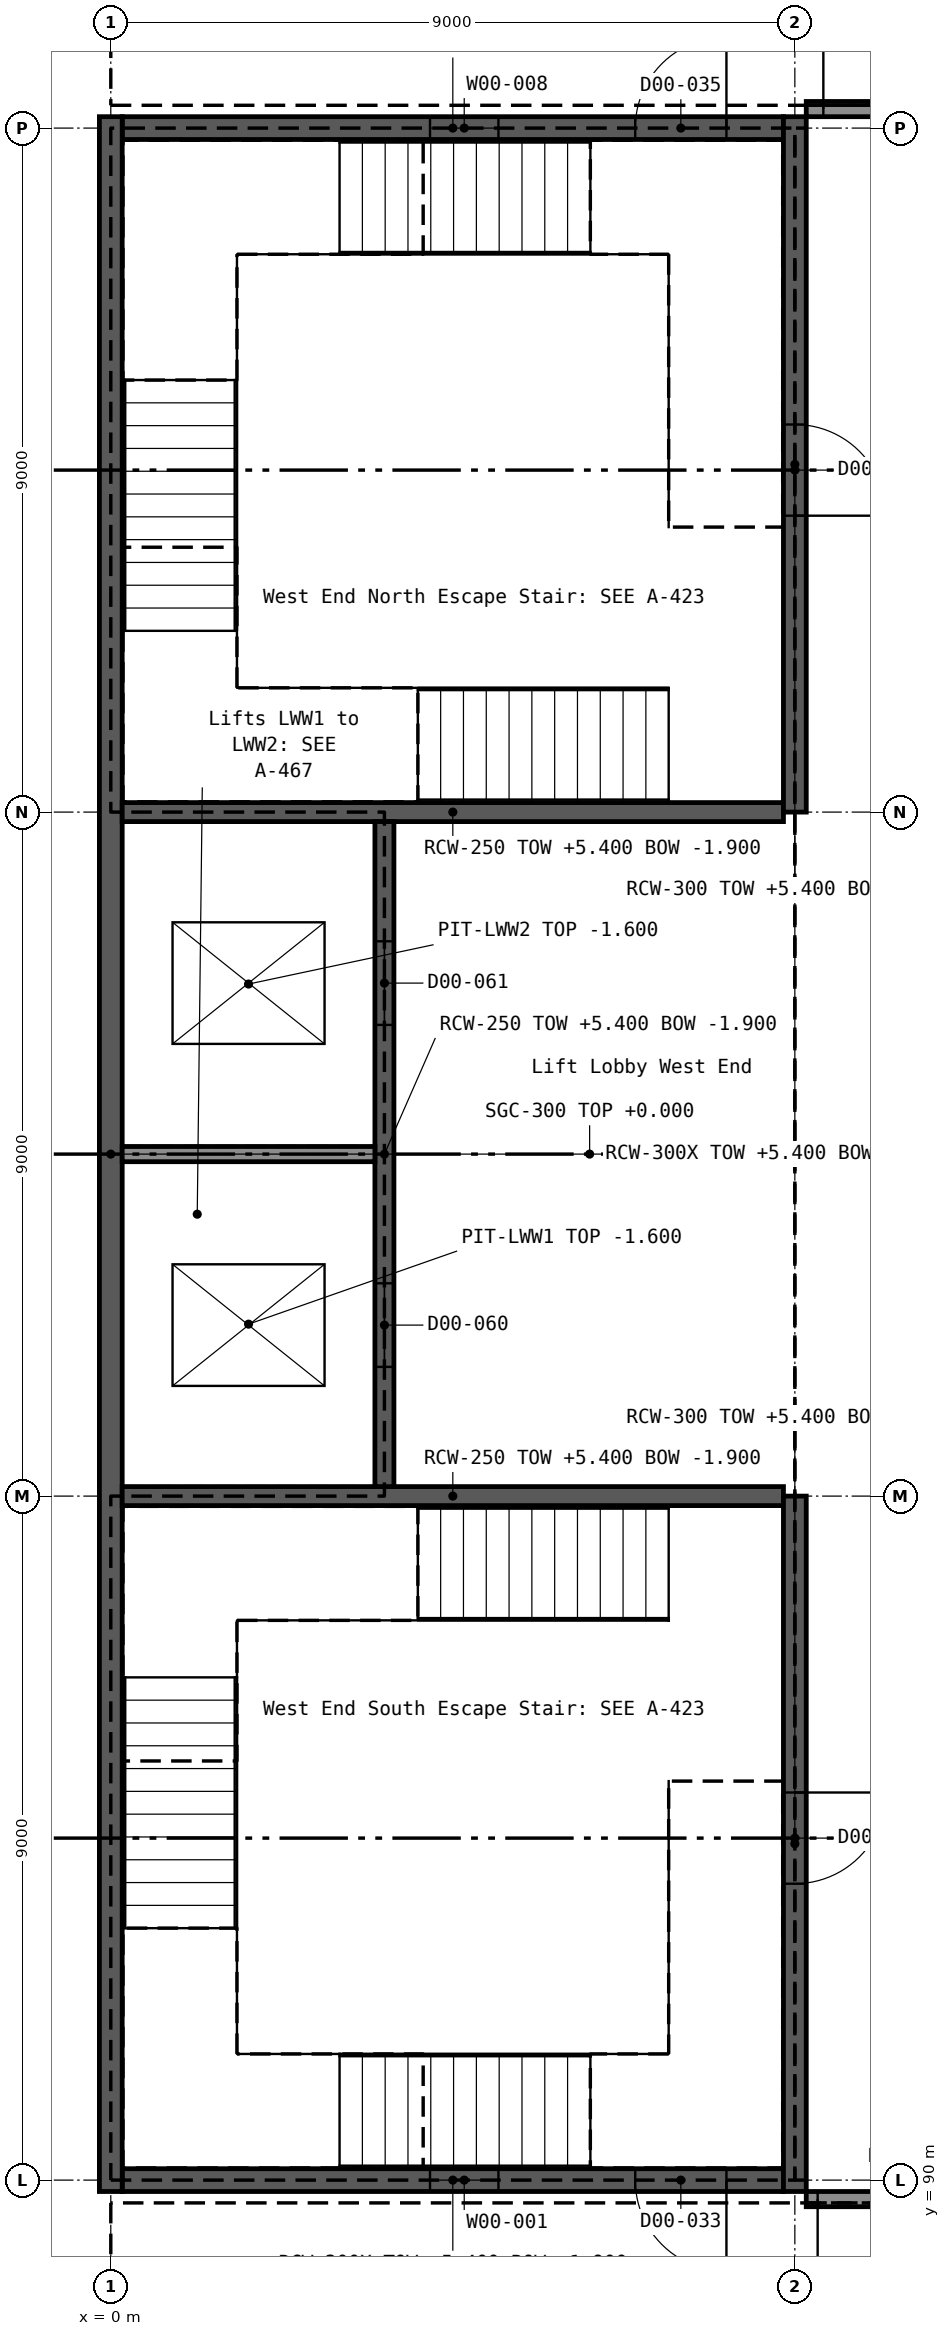
"""IFC4 building model, lengths in metres.
Left out: names, types, materials, properties, quantities, classifications, styles, units other than length and angle.
Written with IfcOpenShell. Run it as: python <this file> out.ifc"""

import sys

from ifc_helpers import new_model, si_unit, direction, frame, frame_2d, origin, place, context, subcontext, project, spatial, rectangle, extrude, element, fill, save


model = new_model("IFC4")
c1 = context("Model", 3, precision=1e-05, world=origin(), true_north=direction((0.0, 1.0)))
c2 = subcontext(c1, "Body", "Model", "MODEL_VIEW")
j1 = project(units=[si_unit("LENGTHUNIT", "METRE"), si_unit("PLANEANGLEUNIT", "RADIAN")], contexts=[c1])
p1 = place(None, origin())
s1 = spatial("IfcSite", under=j1, at=p1, CompositionType="ELEMENT")
p2 = place(p1, origin())
s2 = spatial("IfcBuilding", under=s1, at=p2, CompositionType="ELEMENT")
p3 = place(p2, origin())
s3 = spatial("IfcBuildingStorey", under=s2, at=p3, CompositionType="ELEMENT", Elevation=0.0)
p4 = place(p3, frame((0.15, 90.0, -1.9), z_axis=(0.0, 0.0, 1.0), x_axis=(1.0, 0.0, 0.0)))
e1 = element("IfcWall", 1, at=p4, inside=s3, PredefinedType="SHEAR", context=c2, shape_type="SweptSolid", body=[
    extrude(rectangle(XDim=8.7, YDim=0.3, at=frame_2d((4.35, 0.0))), origin(), (0.0, 0.0, 1.0), 7.3),
])
p5 = place(p4, frame((4.05, 0.0, 3.4)))
e2 = element("IfcOpeningElement", 2, at=p5, cuts=e1, PredefinedType="OPENING", context=c2, shape_type="SweptSolid", body=[
    extrude(rectangle(XDim=0.9, YDim=1.2, at=frame_2d((0.45, 0.6))), frame((0.0, 0.161, 0.0), z_axis=(0.0, -1.0, 0.0), x_axis=(1.0, 0.0, 0.0)), (0.0, 0.0, 1.0), 0.322),
])
p6 = place(p4, frame((6.75, 0.0, 1.9)))
e3 = element("IfcOpeningElement", 3, at=p6, cuts=e1, PredefinedType="OPENING", context=c2, shape_type="SweptSolid", body=[
    extrude(rectangle(XDim=1.2, YDim=2.1, at=frame_2d((0.6, 1.05))), frame((0.0, 0.161, 0.0), z_axis=(0.0, -1.0, 0.0), x_axis=(1.0, 0.0, 0.0)), (0.0, 0.0, 1.0), 0.322),
])
p7 = place(p3, frame((0.15, 117.0, -1.9), z_axis=(0.0, 0.0, 1.0), x_axis=(1.0, 0.0, 0.0)))
e4 = element("IfcWall", 4, at=p7, inside=s3, PredefinedType="SHEAR", context=c2, shape_type="SweptSolid", body=[
    extrude(rectangle(XDim=8.7, YDim=0.3, at=frame_2d((4.35, 0.0))), origin(), (0.0, 0.0, 1.0), 7.3),
])
p8 = place(p7, frame((4.05, 0.0, 3.4)))
e5 = element("IfcOpeningElement", 5, at=p8, cuts=e4, PredefinedType="OPENING", context=c2, shape_type="SweptSolid", body=[
    extrude(rectangle(XDim=0.9, YDim=1.2, at=frame_2d((0.45, 0.6))), frame((0.0, 0.161, 0.0), z_axis=(0.0, -1.0, 0.0), x_axis=(1.0, 0.0, 0.0)), (0.0, 0.0, 1.0), 0.322),
])
p9 = place(p7, frame((6.75, 0.0, 1.9)))
e6 = element("IfcOpeningElement", 6, at=p9, cuts=e4, PredefinedType="OPENING", context=c2, shape_type="SweptSolid", body=[
    extrude(rectangle(XDim=1.2, YDim=2.1, at=frame_2d((0.6, 1.05))), frame((0.0, 0.161, 0.0), z_axis=(0.0, -1.0, 0.0), x_axis=(1.0, 0.0, 0.0)), (0.0, 0.0, 1.0), 0.322),
])
p10 = place(p3, frame((0.0, 89.85, -1.9), z_axis=(0.0, 0.0, 1.0), x_axis=(0.0, 1.0, 0.0)))
e7 = element("IfcWall", 7, at=p10, inside=s3, PredefinedType="SHEAR", context=c2, shape_type="SweptSolid", body=[
    extrude(rectangle(XDim=27.3, YDim=0.3, at=frame_2d((13.65, 0.0))), origin(), (0.0, 0.0, 1.0), 7.3),
])
for number, where, z_axis, x_axis in (
    (8, (0.15, 99.0, -1.9), (0.0, 0.0, 1.0), (1.0, 0.0, 0.0)),
    (9, (0.15, 108.0, -1.9), (0.0, 0.0, 1.0), (1.0, 0.0, 0.0)),
):
    element("IfcWall", number, at=place(p3, frame(where, z_axis=z_axis, x_axis=x_axis)), inside=s3, PredefinedType="SHEAR", context=c2, shape_type="SweptSolid", body=[
        extrude(rectangle(XDim=8.7, YDim=0.25, at=frame_2d((4.35, 0.0))), origin(), (0.0, 0.0, 1.0), 7.3),
    ])
p11 = place(p3, frame((3.6, 99.125, -1.9), z_axis=(0.0, 0.0, 1.0), x_axis=(0.0, 1.0, 0.0)))
e10 = element("IfcWall", 10, at=p11, inside=s3, PredefinedType="SHEAR", context=c2, shape_type="SweptSolid", body=[
    extrude(rectangle(XDim=8.75, YDim=0.25, at=frame_2d((4.375, 0.0))), origin(), (0.0, 0.0, 1.0), 7.3),
])
p12 = place(p11, frame((1.575, 0.0, 1.9)))
e11 = element("IfcOpeningElement", 11, at=p12, cuts=e10, PredefinedType="OPENING", context=c2, shape_type="SweptSolid", body=[
    extrude(rectangle(XDim=1.1, YDim=2.1, at=frame_2d((0.55, 1.05))), frame((0.0, 0.136, 0.0), z_axis=(0.0, -1.0, 0.0), x_axis=(1.0, 0.0, 0.0)), (0.0, 0.0, 1.0), 0.272),
])
p13 = place(p11, frame((6.075, 0.0, 1.9)))
e12 = element("IfcOpeningElement", 12, at=p13, cuts=e10, PredefinedType="OPENING", context=c2, shape_type="SweptSolid", body=[
    extrude(rectangle(XDim=1.1, YDim=2.1, at=frame_2d((0.55, 1.05))), frame((0.0, 0.136, 0.0), z_axis=(0.0, -1.0, 0.0), x_axis=(1.0, 0.0, 0.0)), (0.0, 0.0, 1.0), 0.272),
])
p14 = place(p3, frame((9.0, 89.85, -1.9), z_axis=(0.0, 0.0, 1.0), x_axis=(0.0, 1.0, 0.0)))
e13 = element("IfcWall", 13, at=p14, inside=s3, PredefinedType="SHEAR", context=c2, shape_type="SweptSolid", body=[
    extrude(rectangle(XDim=9.15, YDim=0.3, at=frame_2d((4.575, 0.0))), origin(), (0.0, 0.0, 1.0), 7.3),
])
p15 = place(p14, frame((4.05, 0.0, 1.9)))
e14 = element("IfcOpeningElement", 14, at=p15, cuts=e13, PredefinedType="OPENING", context=c2, shape_type="SweptSolid", body=[
    extrude(rectangle(XDim=1.2, YDim=2.1, at=frame_2d((0.6, 1.05))), frame((0.0, 0.161, 0.0), z_axis=(0.0, -1.0, 0.0), x_axis=(1.0, 0.0, 0.0)), (0.0, 0.0, 1.0), 0.322),
])
p16 = place(p3, frame((9.0, 108.0, -1.9), z_axis=(0.0, 0.0, 1.0), x_axis=(0.0, 1.0, 0.0)))
e15 = element("IfcWall", 15, at=p16, inside=s3, PredefinedType="SHEAR", context=c2, shape_type="SweptSolid", body=[
    extrude(rectangle(XDim=9.15, YDim=0.3, at=frame_2d((4.575, 0.0))), origin(), (0.0, 0.0, 1.0), 7.3),
])
p17 = place(p16, frame((3.9, 0.0, 1.9)))
e16 = element("IfcOpeningElement", 16, at=p17, cuts=e15, PredefinedType="OPENING", context=c2, shape_type="SweptSolid", body=[
    extrude(rectangle(XDim=1.2, YDim=2.1, at=frame_2d((0.6, 1.05))), frame((0.0, 0.161, 0.0), z_axis=(0.0, -1.0, 0.0), x_axis=(1.0, 0.0, 0.0)), (0.0, 0.0, 1.0), 0.322),
])
p18 = place(p3, frame((9.15, 89.75, 0.0), z_axis=(0.0, 0.0, 1.0), x_axis=(1.0, 0.0, 0.0)))
e17 = element("IfcWall", 17, at=p18, inside=s3, PredefinedType="SOLIDWALL", context=c2, shape_type="SweptSolid", body=[
    extrude(rectangle(XDim=5.85, YDim=0.2, at=frame_2d((2.925, 0.0))), origin(), (0.0, 0.0, 1.0), 5.4),
])
p19 = place(p18, frame((0.15, 0.0, 0.0)))
e18 = element("IfcOpeningElement", 18, at=p19, cuts=e17, PredefinedType="OPENING", context=c2, shape_type="SweptSolid", body=[
    extrude(rectangle(XDim=2.4, YDim=2.4, at=frame_2d((1.2, 1.2))), frame((0.0, 0.111, 0.0), z_axis=(0.0, -1.0, 0.0), x_axis=(1.0, 0.0, 0.0)), (0.0, 0.0, 1.0), 0.222),
])
p20 = place(p3, frame((12.0, 117.25, 0.0), z_axis=(0.0, 0.0, 1.0), x_axis=(-1.0, 0.0, 0.0)))
e19 = element("IfcWall", 19, at=p20, inside=s3, PredefinedType="SOLIDWALL", context=c2, shape_type="SweptSolid", body=[
    extrude(rectangle(XDim=2.85, YDim=0.2, at=frame_2d((1.425, 0.0))), origin(), (0.0, 0.0, 1.0), 5.4),
])
p21 = place(p20, frame((0.225, 0.0, 0.0)))
e20 = element("IfcOpeningElement", 20, at=p21, cuts=e19, PredefinedType="OPENING", context=c2, shape_type="SweptSolid", body=[
    extrude(rectangle(XDim=2.4, YDim=2.4, at=frame_2d((1.2, 1.2))), frame((0.0, 0.111, 0.0), z_axis=(0.0, -1.0, 0.0), x_axis=(1.0, 0.0, 0.0)), (0.0, 0.0, 1.0), 0.222),
])
p22 = place(p3, frame((0.15, 103.5, -1.9), z_axis=(0.0, 0.0, 1.0), x_axis=(1.0, 0.0, 0.0)))
e21 = element("IfcWall", 21, at=p22, inside=s3, PredefinedType="SOLIDWALL", context=c2, shape_type="SweptSolid", body=[
    extrude(rectangle(XDim=3.325, YDim=0.2, at=frame_2d((1.663, 0.0))), origin(), (0.0, 0.0, 1.0), 7.3),
])
p23 = place(p5, origin())
e22 = element("IfcWindow", 22, at=p23, inside=s3, PartitioningType="SINGLE_PANEL", PredefinedType="WINDOW", context=c2, shape_type="SweptSolid", body=[
    extrude(rectangle(XDim=0.9, YDim=1.2, at=frame_2d((0.45, 0.6))), frame((0.0, 0.03, 0.0), z_axis=(0.0, -1.0, 0.0), x_axis=(1.0, 0.0, 0.0)), (0.0, 0.0, 1.0), 0.06),
])
fill(e2, e22)
p24 = place(p19, frame((2.4, 0.0, 0.0), z_axis=(0.0, 0.0, 1.0), x_axis=(-1.0, 0.0, 0.0)))
e23 = element("IfcDoor", 23, at=p24, inside=s3, OperationType="DOUBLE_DOOR_DOUBLE_SWING", PredefinedType="DOOR", context=c2, shape_type="SweptSolid", body=[
    extrude(rectangle(XDim=2.4, YDim=2.4, at=frame_2d((1.2, 1.2))), frame((0.0, 0.025, 0.0), z_axis=(0.0, -1.0, 0.0), x_axis=(1.0, 0.0, 0.0)), (0.0, 0.0, 1.0), 0.05),
])
fill(e18, e23)
p25 = place(p21, frame((2.4, 0.0, 0.0), z_axis=(0.0, 0.0, 1.0), x_axis=(-1.0, 0.0, 0.0)))
e24 = element("IfcDoor", 24, at=p25, inside=s3, OperationType="DOUBLE_DOOR_DOUBLE_SWING", PredefinedType="DOOR", context=c2, shape_type="SweptSolid", body=[
    extrude(rectangle(XDim=2.4, YDim=2.4, at=frame_2d((1.2, 1.2))), frame((0.0, 0.025, 0.0), z_axis=(0.0, -1.0, 0.0), x_axis=(1.0, 0.0, 0.0)), (0.0, 0.0, 1.0), 0.05),
])
fill(e20, e24)
p26 = place(p8, origin())
e25 = element("IfcWindow", 25, at=p26, inside=s3, PartitioningType="SINGLE_PANEL", PredefinedType="WINDOW", context=c2, shape_type="SweptSolid", body=[
    extrude(rectangle(XDim=0.9, YDim=1.2, at=frame_2d((0.45, 0.6))), frame((0.0, 0.03, 0.0), z_axis=(0.0, -1.0, 0.0), x_axis=(1.0, 0.0, 0.0)), (0.0, 0.0, 1.0), 0.06),
])
fill(e5, e25)
p27 = place(p15, frame((1.2, 0.0, 0.0), z_axis=(0.0, 0.0, 1.0), x_axis=(-1.0, 0.0, 0.0)))
e26 = element("IfcDoor", 26, at=p27, inside=s3, OperationType="SINGLE_SWING_LEFT", PredefinedType="DOOR", context=c2, shape_type="SweptSolid", body=[
    extrude(rectangle(XDim=1.2, YDim=2.1, at=frame_2d((0.6, 1.05))), frame((0.0, 0.025, 0.0), z_axis=(0.0, -1.0, 0.0), x_axis=(1.0, 0.0, 0.0)), (0.0, 0.0, 1.0), 0.05),
])
fill(e14, e26)
p28 = place(p6, frame((1.2, 0.0, 0.0), z_axis=(0.0, 0.0, 1.0), x_axis=(-1.0, 0.0, 0.0)))
e27 = element("IfcDoor", 27, at=p28, inside=s3, OperationType="SINGLE_SWING_LEFT", PredefinedType="DOOR", context=c2, shape_type="SweptSolid", body=[
    extrude(rectangle(XDim=1.2, YDim=2.1, at=frame_2d((0.6, 1.05))), frame((0.0, 0.025, 0.0), z_axis=(0.0, -1.0, 0.0), x_axis=(1.0, 0.0, 0.0)), (0.0, 0.0, 1.0), 0.05),
])
fill(e3, e27)
p29 = place(p17, frame((1.2, 0.0, 0.0), z_axis=(0.0, 0.0, 1.0), x_axis=(-1.0, 0.0, 0.0)))
e28 = element("IfcDoor", 28, at=p29, inside=s3, OperationType="SINGLE_SWING_RIGHT", PredefinedType="DOOR", context=c2, shape_type="SweptSolid", body=[
    extrude(rectangle(XDim=1.2, YDim=2.1, at=frame_2d((0.6, 1.05))), frame((0.0, 0.025, 0.0), z_axis=(0.0, -1.0, 0.0), x_axis=(1.0, 0.0, 0.0)), (0.0, 0.0, 1.0), 0.05),
])
fill(e16, e28)
p30 = place(p9, origin())
e29 = element("IfcDoor", 29, at=p30, inside=s3, OperationType="SINGLE_SWING_RIGHT", PredefinedType="DOOR", context=c2, shape_type="SweptSolid", body=[
    extrude(rectangle(XDim=1.2, YDim=2.1, at=frame_2d((0.6, 1.05))), frame((0.0, 0.025, 0.0), z_axis=(0.0, -1.0, 0.0), x_axis=(1.0, 0.0, 0.0)), (0.0, 0.0, 1.0), 0.05),
])
fill(e6, e29)
p31 = place(p12, origin())
e30 = element("IfcDoor", 30, at=p31, inside=s3, OperationType="DOUBLE_DOOR_SLIDING", PredefinedType="DOOR", context=c2, shape_type="SweptSolid", body=[
    extrude(rectangle(XDim=1.1, YDim=2.1, at=frame_2d((0.55, 1.05))), frame((0.0, 0.025, 0.0), z_axis=(0.0, -1.0, 0.0), x_axis=(1.0, 0.0, 0.0)), (0.0, 0.0, 1.0), 0.05),
])
fill(e11, e30)
p32 = place(p13, origin())
e31 = element("IfcDoor", 31, at=p32, inside=s3, OperationType="DOUBLE_DOOR_SLIDING", PredefinedType="DOOR", context=c2, shape_type="SweptSolid", body=[
    extrude(rectangle(XDim=1.1, YDim=2.1, at=frame_2d((0.55, 1.05))), frame((0.0, 0.025, 0.0), z_axis=(0.0, -1.0, 0.0), x_axis=(1.0, 0.0, 0.0)), (0.0, 0.0, 1.0), 0.05),
])
fill(e12, e31)
save(model, sys.argv[1])
